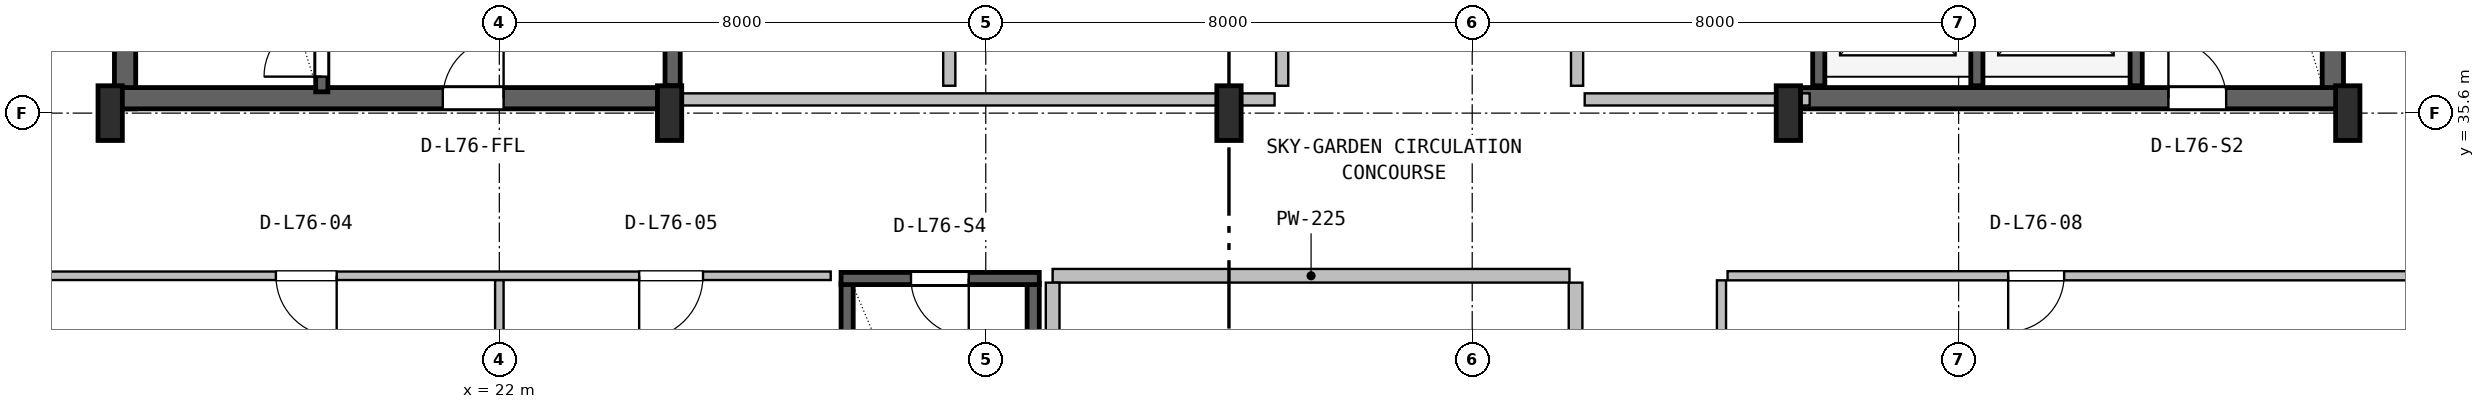
"""IFC4 building model, lengths in metres.
Left out: names, types, materials, properties, quantities, classifications, styles, units other than length and angle.
Written with IfcOpenShell. Run it as: python <this file> out.ifc"""

import sys

from ifc_helpers import new_model, si_unit, direction, frame, frame_2d, origin, origin_2d, place, context, subcontext, project, spatial, rectangle, i_section, extrude, source, transform, mapped, element, fill, save


model = new_model("IFC4")
c1 = context("Model", 3, precision=1e-05, world=origin(), true_north=direction((0.0, 1.0)))
c2 = subcontext(c1, "Body", "Model", "MODEL_VIEW")
j1 = project(units=[si_unit("LENGTHUNIT", "METRE"), si_unit("PLANEANGLEUNIT", "RADIAN")], contexts=[c1])
p1 = place(None, origin())
s1 = spatial("IfcSite", under=j1, at=p1, CompositionType="ELEMENT")
p2 = place(p1, origin())
s2 = spatial("IfcBuilding", under=s1, at=p2, CompositionType="ELEMENT")
p3 = place(p2, frame((0.0, 0.0, 305.0)))
s3 = spatial("IfcBuildingStorey", under=s2, at=p3, CompositionType="ELEMENT", Elevation=305.0)
for number, where, z_axis, x_axis in (
    (1, (15.845, 35.67, 0.0), (0.0, 0.0, 1.0), (0.0, 1.0, 0.0)),
    (2, (52.155, 35.67, 0.0), (0.0, 0.0, 1.0), (0.0, 1.0, 0.0)),
):
    element("IfcWall", number, at=place(p3, frame(where, z_axis=z_axis, x_axis=x_axis)), inside=s3, PredefinedType="SHEAR", context=c2, shape_type="SweptSolid", body=[
        extrude(rectangle(XDim=11.13, YDim=0.35, at=frame_2d((5.565, 0.0))), origin(), (0.0, 0.0, 1.0), 4.52),
    ])
p4 = place(p3, frame((15.67, 35.845, 0.0), z_axis=(0.0, 0.0, 1.0), x_axis=(1.0, 0.0, 0.0)))
e3 = element("IfcWall", 3, at=p4, inside=s3, PredefinedType="SHEAR", context=c2, shape_type="SweptSolid", body=[
    extrude(rectangle(XDim=9.13, YDim=0.35, at=frame_2d((4.565, 0.0))), origin(), (0.0, 0.0, 1.0), 4.52),
])
p5 = place(p4, frame((5.4, 0.0, 0.0)))
e4 = element("IfcOpeningElement", 4, at=p5, cuts=e3, PredefinedType="OPENING", context=c2, shape_type="SweptSolid", body=[
    extrude(rectangle(XDim=1.0, YDim=2.1, at=frame_2d((0.5, 1.05))), frame((0.0, 0.185, 0.0), z_axis=(0.0, -1.0, 0.0), x_axis=(1.0, 0.0, 0.0)), (0.0, 0.0, 1.0), 0.37),
])
p6 = place(p3, frame((43.2, 35.845, 0.0), z_axis=(0.0, 0.0, 1.0), x_axis=(1.0, 0.0, 0.0)))
e5 = element("IfcWall", 5, at=p6, inside=s3, PredefinedType="SHEAR", context=c2, shape_type="SweptSolid", body=[
    extrude(rectangle(XDim=9.13, YDim=0.35, at=frame_2d((4.565, 0.0))), origin(), (0.0, 0.0, 1.0), 4.52),
])
p7 = place(p6, frame((6.25, 0.0, 0.0)))
e6 = element("IfcOpeningElement", 6, at=p7, cuts=e5, PredefinedType="OPENING", context=c2, shape_type="SweptSolid", body=[
    extrude(rectangle(XDim=0.95, YDim=2.1, at=frame_2d((0.475, 1.05))), frame((0.0, 0.185, 0.0), z_axis=(0.0, -1.0, 0.0), x_axis=(1.0, 0.0, 0.0)), (0.0, 0.0, 1.0), 0.37),
])
m1 = source(origin(), c2, "Body", "SweptSolid", [
    extrude(i_section(OverallWidth=0.4, OverallDepth=0.9, WebThickness=0.016, FlangeThickness=0.028, FilletRadius=0.016, at=origin_2d()), origin(), (0.0, 0.0, 1.0), 4.8),
])
for number, where, z_axis, x_axis in (
    (7, (15.6, 35.6, 0.0), (0.0, 0.0, 1.0), (1.0, 0.0, 0.0)),
    (8, (24.8, 35.6, 0.0), (0.0, 0.0, 1.0), (1.0, 0.0, 0.0)),
    (9, (34.0, 35.6, 0.0), (0.0, 0.0, 1.0), (1.0, 0.0, 0.0)),
    (10, (43.2, 35.6, 0.0), (0.0, 0.0, 1.0), (1.0, 0.0, 0.0)),
    (11, (52.4, 35.6, 0.0), (0.0, 0.0, 1.0), (1.0, 0.0, 0.0)),
):
    element("IfcColumn", number, at=place(p3, frame(where, z_axis=z_axis, x_axis=x_axis)), inside=s3, PredefinedType="COLUMN", context=c2, shape_type="MappedRepresentation", body=[
        mapped(m1, transform((0.0, 0.0, 0.0), x_axis=(1.0, 0.0, 0.0), y_axis=(0.0, 1.0, 0.0), z_axis=(0.0, 0.0, 1.0), scale=1.0)),
    ])
p8 = place(p3, frame((19.08, 35.95, 0.0), z_axis=(0.0, 0.0, 1.0), x_axis=(0.0, 1.0, 0.0)))
e12 = element("IfcWall", 12, at=p8, inside=s3, PredefinedType="SHEAR", context=c2, shape_type="SweptSolid", body=[
    extrude(rectangle(XDim=9.65, YDim=0.2, at=frame_2d((4.825, 0.0))), origin(), (0.0, 0.0, 1.0), 4.52),
])
p9 = place(p8, frame((0.25, 0.0, 0.0)))
e13 = element("IfcOpeningElement", 13, at=p9, cuts=e12, PredefinedType="OPENING", context=c2, shape_type="SweptSolid", body=[
    extrude(rectangle(XDim=0.95, YDim=2.1, at=frame_2d((0.475, 1.05))), frame((0.0, 0.11, 0.0), z_axis=(0.0, -1.0, 0.0), x_axis=(1.0, 0.0, 0.0)), (0.0, 0.0, 1.0), 0.22),
])
p10 = place(p3, frame((24.85, 36.05, 0.0), z_axis=(0.0, 0.0, 1.0), x_axis=(0.0, 1.0, 0.0)))
e14 = element("IfcWall", 14, at=p10, inside=s3, PredefinedType="SHEAR", context=c2, shape_type="SweptSolid", body=[
    extrude(rectangle(XDim=10.45, YDim=0.25, at=frame_2d((5.225, 0.0))), origin(), (0.0, 0.0, 1.0), 4.52),
])
p11 = place(p3, frame((48.92, 36.05, 0.0), z_axis=(0.0, 0.0, 1.0), x_axis=(0.0, 1.0, 0.0)))
e15 = element("IfcWall", 15, at=p11, inside=s3, PredefinedType="SHEAR", context=c2, shape_type="SweptSolid", body=[
    extrude(rectangle(XDim=10.5, YDim=0.2, at=frame_2d((5.25, 0.0))), origin(), (0.0, 0.0, 1.0), 4.52),
])
for number, where, z_axis, x_axis in (
    (16, (43.7, 36.05, 0.0), (0.0, 0.0, 1.0), (0.0, 1.0, 0.0)),
    (17, (46.3, 36.05, 0.0), (0.0, 0.0, 1.0), (0.0, 1.0, 0.0)),
):
    element("IfcWall", number, at=place(p3, frame(where, z_axis=z_axis, x_axis=x_axis)), inside=s3, PredefinedType="SHEAR", context=c2, shape_type="SweptSolid", body=[
        extrude(rectangle(XDim=3.05, YDim=0.2, at=frame_2d((1.525, 0.0))), origin(), (0.0, 0.0, 1.0), 4.52),
    ])
for number, where, z_axis, x_axis in (
    (18, (27.72, 26.0, 0.0), (0.0, 0.0, 1.0), (0.0, 1.0, 0.0)),
    (19, (30.78, 26.0, 0.0), (0.0, 0.0, 1.0), (0.0, 1.0, 0.0)),
):
    element("IfcWall", number, at=place(p3, frame(where, z_axis=z_axis, x_axis=x_axis)), inside=s3, PredefinedType="SHEAR", context=c2, shape_type="SweptSolid", body=[
        extrude(rectangle(XDim=6.8, YDim=0.2, at=frame_2d((3.4, 0.0))), origin(), (0.0, 0.0, 1.0), 4.52),
    ])
p12 = place(p3, frame((27.62, 32.88, 0.0), z_axis=(0.0, 0.0, 1.0), x_axis=(1.0, 0.0, 0.0)))
e20 = element("IfcWall", 20, at=p12, inside=s3, PredefinedType="SHEAR", context=c2, shape_type="SweptSolid", body=[
    extrude(rectangle(XDim=3.26, YDim=0.2, at=frame_2d((1.63, 0.0))), origin(), (0.0, 0.0, 1.0), 4.52),
])
p13 = place(p12, frame((1.15, 0.0, 0.0)))
e21 = element("IfcOpeningElement", 21, at=p13, cuts=e20, PredefinedType="OPENING", context=c2, shape_type="SweptSolid", body=[
    extrude(rectangle(XDim=0.95, YDim=2.1, at=frame_2d((0.475, 1.05))), frame((0.0, 0.11, 0.0), z_axis=(0.0, -1.0, 0.0), x_axis=(1.0, 0.0, 0.0)), (0.0, 0.0, 1.0), 0.22),
])
p14 = place(p3, frame((25.0, 35.825, 0.0), z_axis=(0.0, 0.0, 1.0), x_axis=(1.0, 0.0, 0.0)))
e22 = element("IfcWall", 22, at=p14, inside=s3, PredefinedType="PLUMBINGWALL", context=c2, shape_type="SweptSolid", body=[
    extrude(rectangle(XDim=9.75, YDim=0.2, at=frame_2d((4.875, 0.0))), origin(), (0.0, 0.0, 1.0), 3.545),
])
for number, where, z_axis, x_axis in (
    (23, (29.4, 36.05, 0.0), (0.0, 0.0, 1.0), (0.0, 1.0, 0.0)),
    (24, (34.875, 36.05, 0.0), (0.0, 0.0, 1.0), (0.0, 1.0, 0.0)),
):
    element("IfcWall", number, at=place(p3, frame(where, z_axis=z_axis, x_axis=x_axis)), inside=s3, PredefinedType="PLUMBINGWALL", context=c2, shape_type="SweptSolid", body=[
        extrude(rectangle(XDim=3.1, YDim=0.2, at=frame_2d((1.55, 0.0))), origin(), (0.0, 0.0, 1.0), 4.5),
    ])
p15 = place(p3, frame((39.85, 35.825, 0.0), z_axis=(0.0, 0.0, 1.0), x_axis=(1.0, 0.0, 0.0)))
e25 = element("IfcWall", 25, at=p15, inside=s3, PredefinedType="SOLIDWALL", context=c2, shape_type="SweptSolid", body=[
    extrude(rectangle(XDim=3.7, YDim=0.2, at=frame_2d((1.85, 0.0))), origin(), (0.0, 0.0, 1.0), 3.545),
])
p16 = place(p3, frame((39.725, 36.05, 0.0), z_axis=(0.0, 0.0, 1.0), x_axis=(0.0, 1.0, 0.0)))
e26 = element("IfcWall", 26, at=p16, inside=s3, PredefinedType="SOLIDWALL", context=c2, shape_type="SweptSolid", body=[
    extrude(rectangle(XDim=3.1, YDim=0.2, at=frame_2d((1.55, 0.0))), origin(), (0.0, 0.0, 1.0), 4.5),
])
p17 = place(p3, frame((22.0, 24.57, 0.0), z_axis=(0.0, 0.0, 1.0), x_axis=(0.0, 1.0, 0.0)))
e27 = element("IfcWall", 27, at=p17, inside=s3, PredefinedType="PARTITIONING", context=c2, shape_type="SweptSolid", body=[
    extrude(rectangle(XDim=8.285, YDim=0.14, at=frame_2d((4.143, 0.0))), origin(), (0.0, 0.0, 1.0), 4.5),
])
p18 = place(p3, frame((12.18, 32.925, 0.0), z_axis=(0.0, 0.0, 1.0), x_axis=(1.0, 0.0, 0.0)))
e28 = element("IfcWall", 28, at=p18, inside=s3, PredefinedType="PARTITIONING", context=c2, shape_type="SweptSolid", body=[
    extrude(rectangle(XDim=15.27, YDim=0.14, at=frame_2d((7.635, 0.0))), origin(), (0.0, 0.0, 1.0), 3.951),
])
p19 = place(p18, frame((6.145, 0.0, 0.0)))
e29 = element("IfcOpeningElement", 29, at=p19, cuts=e28, PredefinedType="OPENING", context=c2, shape_type="SweptSolid", body=[
    extrude(rectangle(XDim=1.0, YDim=2.1, at=frame_2d((0.5, 1.05))), frame((0.0, 0.08, 0.0), z_axis=(0.0, -1.0, 0.0), x_axis=(1.0, 0.0, 0.0)), (0.0, 0.0, 1.0), 0.16),
])
p20 = place(p18, frame((12.12, 0.0, 0.0)))
e30 = element("IfcOpeningElement", 30, at=p20, cuts=e28, PredefinedType="OPENING", context=c2, shape_type="SweptSolid", body=[
    extrude(rectangle(XDim=1.05, YDim=2.1, at=frame_2d((0.525, 1.05))), frame((0.0, 0.08, 0.0), z_axis=(0.0, -1.0, 0.0), x_axis=(1.0, 0.0, 0.0)), (0.0, 0.0, 1.0), 0.16),
])
p21 = place(p3, frame((39.7, 13.38, 0.0), z_axis=(0.0, 0.0, 1.0), x_axis=(0.0, 1.0, 0.0)))
e31 = element("IfcWall", 31, at=p21, inside=s3, PredefinedType="PARTITIONING", context=c2, shape_type="SweptSolid", body=[
    extrude(rectangle(XDim=19.432, YDim=0.225, at=frame_2d((9.716, 0.0))), origin(), (0.0, 0.0, 1.0), 3.951),
])
p22 = place(p21, frame((9.465, 0.0, 0.0)))
e32 = element("IfcOpeningElement", 32, at=p22, cuts=e31, PredefinedType="OPENING", context=c2, shape_type="SweptSolid", body=[
    extrude(rectangle(XDim=1.4, YDim=2.12, at=frame_2d((0.7, 1.06))), frame((0.0, 0.123, 0.0), z_axis=(0.0, -1.0, 0.0), x_axis=(1.0, 0.0, 0.0)), (0.0, 0.0, 1.0), 0.245),
])
p23 = place(p3, frame((31.1, 32.925, 0.0), z_axis=(0.0, 0.0, 1.0), x_axis=(1.0, 0.0, 0.0)))
e33 = element("IfcWall", 33, at=p23, inside=s3, PredefinedType="PARTITIONING", context=c2, shape_type="SweptSolid", body=[
    extrude(rectangle(XDim=8.5, YDim=0.225, at=frame_2d((4.25, 0.0))), origin(), (0.0, 0.0, 1.0), 3.951),
])
p24 = place(p3, frame((31.1, 13.38, 0.0), z_axis=(0.0, 0.0, 1.0), x_axis=(0.0, 1.0, 0.0)))
e34 = element("IfcWall", 34, at=p24, inside=s3, PredefinedType="PARTITIONING", context=c2, shape_type="SweptSolid", body=[
    extrude(rectangle(XDim=19.432, YDim=0.225, at=frame_2d((9.716, 0.0))), origin(), (0.0, 0.0, 1.0), 3.951),
])
p25 = place(p3, frame((42.1, 14.55, 0.0), z_axis=(0.0, 0.0, 1.0), x_axis=(0.0, 1.0, 0.0)))
e35 = element("IfcWall", 35, at=p25, inside=s3, PredefinedType="PARTITIONING", context=c2, shape_type="SweptSolid", body=[
    extrude(rectangle(XDim=18.3, YDim=0.15, at=frame_2d((9.15, 0.0))), origin(), (0.0, 0.0, 1.0), 3.951),
])
p26 = place(p25, frame((4.185, 0.0, 0.0)))
e36 = element("IfcOpeningElement", 36, at=p26, cuts=e35, PredefinedType="OPENING", context=c2, shape_type="SweptSolid", body=[
    extrude(rectangle(XDim=0.88, YDim=2.06, at=frame_2d((0.44, 1.03))), frame((0.0, 0.085, 0.0), z_axis=(0.0, -1.0, 0.0), x_axis=(1.0, 0.0, 0.0)), (0.0, 0.0, 1.0), 0.17),
])
p27 = place(p3, frame((42.2, 32.925, 0.0), z_axis=(0.0, 0.0, 1.0), x_axis=(1.0, 0.0, 0.0)))
e37 = element("IfcWall", 37, at=p27, inside=s3, PredefinedType="PARTITIONING", context=c2, shape_type="SweptSolid", body=[
    extrude(rectangle(XDim=13.62, YDim=0.15, at=frame_2d((6.81, 0.0))), origin(), (0.0, 0.0, 1.0), 3.951),
])
p28 = place(p27, frame((4.615, 0.0, 0.0)))
e38 = element("IfcOpeningElement", 38, at=p28, cuts=e37, PredefinedType="OPENING", context=c2, shape_type="SweptSolid", body=[
    extrude(rectangle(XDim=0.92, YDim=2.08, at=frame_2d((0.46, 1.04))), frame((0.0, 0.085, 0.0), z_axis=(0.0, -1.0, 0.0), x_axis=(1.0, 0.0, 0.0)), (0.0, 0.0, 1.0), 0.17),
])
m2 = source(origin(), c2, "Body", "SweptSolid", [
    extrude(rectangle(XDim=0.95, YDim=2.1, at=frame_2d((0.475, 1.05))), frame((0.0, 0.025, 0.0), z_axis=(0.0, -1.0, 0.0), x_axis=(1.0, 0.0, 0.0)), (0.0, 0.0, 1.0), 0.05),
])
p29 = place(p9, origin())
e39 = element("IfcDoor", 39, at=p29, inside=s3, OperationType="SINGLE_SWING_LEFT", PredefinedType="DOOR", context=c2, shape_type="MappedRepresentation", body=[
    mapped(m2, transform((0.0, 0.0, 0.0), x_axis=(1.0, 0.0, 0.0), y_axis=(0.0, 1.0, 0.0), z_axis=(0.0, 0.0, 1.0), scale=1.0)),
])
fill(e13, e39)
m3 = source(origin(), c2, "Body", "SweptSolid", [
    extrude(rectangle(XDim=1.0, YDim=2.1, at=frame_2d((0.5, 1.05))), frame((0.0, 0.025, 0.0), z_axis=(0.0, -1.0, 0.0), x_axis=(1.0, 0.0, 0.0)), (0.0, 0.0, 1.0), 0.05),
])
p30 = place(p5, origin())
e40 = element("IfcDoor", 40, at=p30, inside=s3, OperationType="SINGLE_SWING_RIGHT", PredefinedType="DOOR", context=c2, shape_type="MappedRepresentation", body=[
    mapped(m3, transform((0.0, 0.0, 0.0), x_axis=(1.0, 0.0, 0.0), y_axis=(0.0, 1.0, 0.0), z_axis=(0.0, 0.0, 1.0), scale=1.0)),
])
fill(e4, e40)
p31 = place(p7, origin())
e41 = element("IfcDoor", 41, at=p31, inside=s3, OperationType="SINGLE_SWING_LEFT", PredefinedType="DOOR", context=c2, shape_type="MappedRepresentation", body=[
    mapped(m2, transform((0.0, 0.0, 0.0), x_axis=(1.0, 0.0, 0.0), y_axis=(0.0, 1.0, 0.0), z_axis=(0.0, 0.0, 1.0), scale=1.0)),
])
fill(e6, e41)
p32 = place(p13, frame((0.95, 0.0, 0.0), z_axis=(0.0, 0.0, 1.0), x_axis=(-1.0, 0.0, 0.0)))
e42 = element("IfcDoor", 42, at=p32, inside=s3, OperationType="SINGLE_SWING_RIGHT", PredefinedType="DOOR", context=c2, shape_type="MappedRepresentation", body=[
    mapped(m2, transform((0.0, 0.0, 0.0), x_axis=(1.0, 0.0, 0.0), y_axis=(0.0, 1.0, 0.0), z_axis=(0.0, 0.0, 1.0), scale=1.0)),
])
fill(e21, e42)
m4 = source(origin(), c2, "Body", "SweptSolid", [
    extrude(rectangle(XDim=1.0, YDim=2.1, at=frame_2d((0.5, 1.05))), frame((0.0, 0.025, 0.0), z_axis=(0.0, -1.0, 0.0), x_axis=(1.0, 0.0, 0.0)), (0.0, 0.0, 1.0), 0.05),
])
p33 = place(p19, frame((1.0, 0.0, 0.0), z_axis=(0.0, 0.0, 1.0), x_axis=(-1.0, 0.0, 0.0)))
e43 = element("IfcDoor", 43, at=p33, inside=s3, OperationType="SINGLE_SWING_RIGHT", PredefinedType="DOOR", context=c2, shape_type="MappedRepresentation", body=[
    mapped(m4, transform((0.0, 0.0, 0.0), x_axis=(1.0, 0.0, 0.0), y_axis=(0.0, 1.0, 0.0), z_axis=(0.0, 0.0, 1.0), scale=1.0)),
])
fill(e29, e43)
m5 = source(origin(), c2, "Body", "SweptSolid", [
    extrude(rectangle(XDim=1.05, YDim=2.1, at=frame_2d((0.525, 1.05))), frame((0.0, 0.025, 0.0), z_axis=(0.0, -1.0, 0.0), x_axis=(1.0, 0.0, 0.0)), (0.0, 0.0, 1.0), 0.05),
])
p34 = place(p20, frame((1.05, 0.0, 0.0), z_axis=(0.0, 0.0, 1.0), x_axis=(-1.0, 0.0, 0.0)))
e44 = element("IfcDoor", 44, at=p34, inside=s3, OperationType="SINGLE_SWING_LEFT", PredefinedType="DOOR", context=c2, shape_type="MappedRepresentation", body=[
    mapped(m5, transform((0.0, 0.0, 0.0), x_axis=(1.0, 0.0, 0.0), y_axis=(0.0, 1.0, 0.0), z_axis=(0.0, 0.0, 1.0), scale=1.0)),
])
fill(e30, e44)
m6 = source(origin(), c2, "Body", "SweptSolid", [
    extrude(rectangle(XDim=0.92, YDim=2.08, at=frame_2d((0.46, 1.04))), frame((0.0, 0.025, 0.0), z_axis=(0.0, -1.0, 0.0), x_axis=(1.0, 0.0, 0.0)), (0.0, 0.0, 1.0), 0.05),
])
p35 = place(p28, frame((0.92, 0.0, 0.0), z_axis=(0.0, 0.0, 1.0), x_axis=(-1.0, 0.0, 0.0)))
e45 = element("IfcDoor", 45, at=p35, inside=s3, OperationType="SINGLE_SWING_LEFT", PredefinedType="DOOR", context=c2, shape_type="MappedRepresentation", body=[
    mapped(m6, transform((0.0, 0.0, 0.0), x_axis=(1.0, 0.0, 0.0), y_axis=(0.0, 1.0, 0.0), z_axis=(0.0, 0.0, 1.0), scale=1.0)),
])
fill(e38, e45)
save(model, sys.argv[1])
